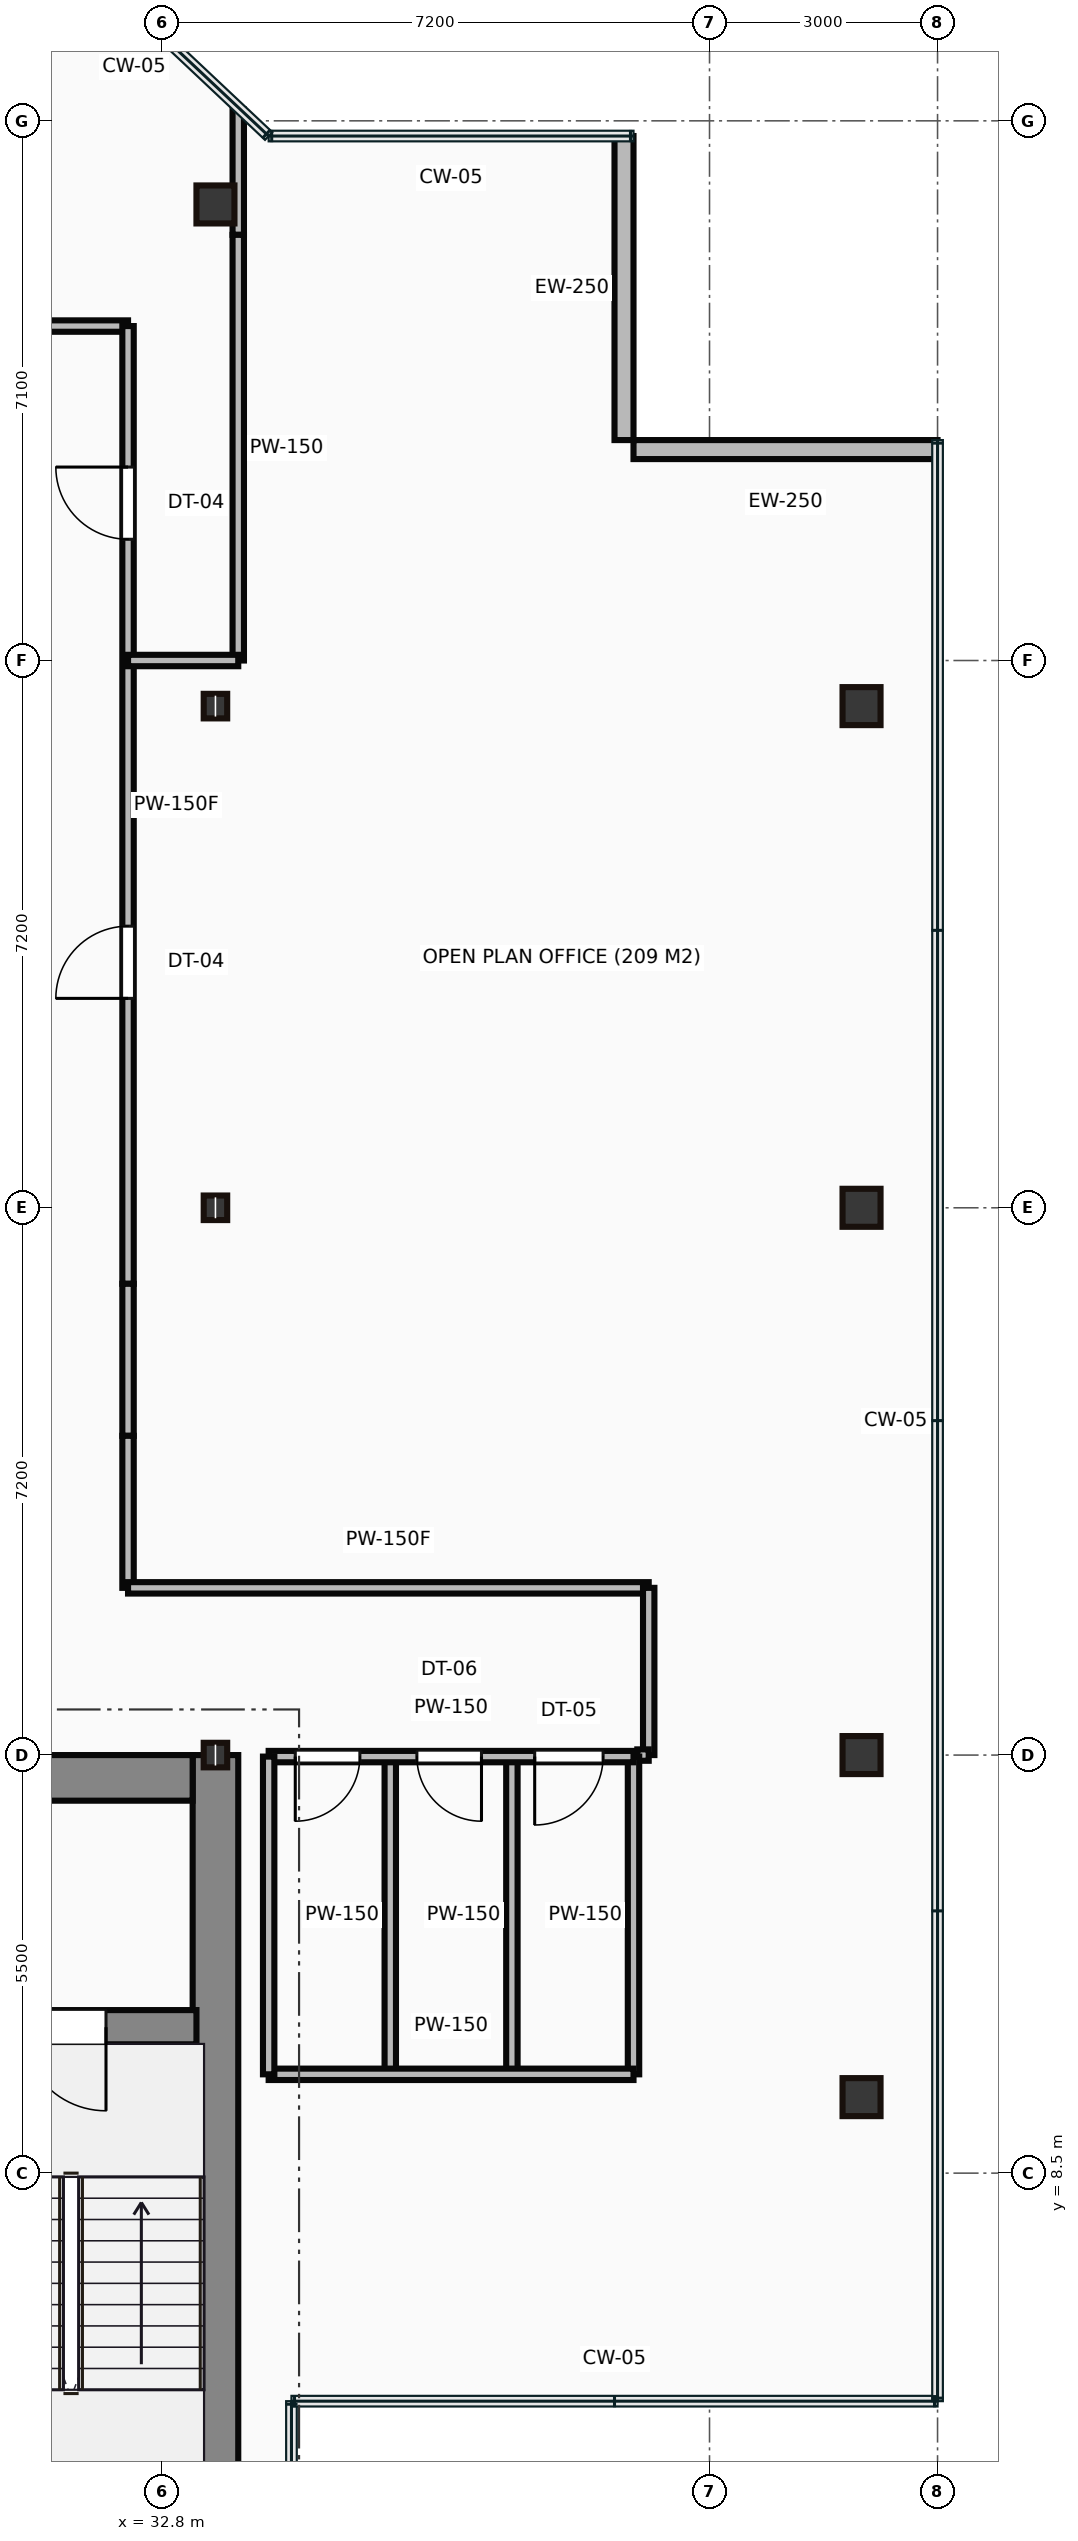
"""IFC4 building model, lengths in metres.
Left out: names, types, materials, properties, quantities, classifications, styles, units other than length and angle.
Written with IfcOpenShell. Run it as: python <this file> out.ifc"""

import sys

from ifc_helpers import new_model, si_unit, direction, frame, frame_2d, origin, origin_2d, place, context, subcontext, project, spatial, rectangle, hollow_rectangle, i_section, extrude, source, transform, mapped, element, fill, save


model = new_model("IFC4")
c1 = context("Model", 3, precision=1e-05, world=origin(), true_north=direction((0.0, 1.0)))
c2 = subcontext(c1, "Body", "Model", "MODEL_VIEW")
j1 = project(units=[si_unit("LENGTHUNIT", "METRE"), si_unit("PLANEANGLEUNIT", "RADIAN")], contexts=[c1])
p1 = place(None, origin())
s1 = spatial("IfcSite", under=j1, at=p1, CompositionType="ELEMENT")
p2 = place(p1, origin())
s2 = spatial("IfcBuilding", under=s1, at=p2, CompositionType="ELEMENT")
p3 = place(p2, frame((0.0, 0.0, 262.45)))
s3 = spatial("IfcBuildingStorey", under=s2, at=p3, CompositionType="ELEMENT", Elevation=262.45)
m1 = source(origin(), c2, "Body", "SweptSolid", [
    extrude(rectangle(XDim=13.1, YDim=0.6, at=frame_2d((6.55, 0.0))), origin(), (0.0, 0.0, 1.0), 3.65),
])
p4 = place(p3, frame((33.5, 0.9, 0.0), z_axis=(0.0, 0.0, 1.0), x_axis=(0.0, 1.0, 0.0)))
e1 = element("IfcWall", 1, at=p4, inside=s3, PredefinedType="SHEAR", context=c2, shape_type="MappedRepresentation", body=[
    mapped(m1, transform((0.0, 0.0, 0.0))),
])
m2 = source(origin(), c2, "Body", "SweptSolid", [
    extrude(rectangle(XDim=12.6, YDim=0.6, at=frame_2d((6.3, 0.0))), origin(), (0.0, 0.0, 1.0), 3.65),
])
p5 = place(p3, frame((20.6, 13.7, 0.0), z_axis=(0.0, 0.0, 1.0), x_axis=(1.0, 0.0, 0.0)))
e2 = element("IfcWall", 2, at=p5, inside=s3, PredefinedType="SHEAR", context=c2, shape_type="MappedRepresentation", body=[
    mapped(m2, transform((0.0, 0.0, 0.0))),
])
p6 = place(p5, frame((9.25, 0.0, 0.0)))
e3 = element("IfcOpeningElement", 3, at=p6, cuts=e2, PredefinedType="OPENING", context=c2, shape_type="SweptSolid", body=[
    extrude(rectangle(XDim=1.1, YDim=2.15, at=frame_2d((0.55, 1.075))), frame((0.0, 0.31, 0.0), z_axis=(0.0, -1.0, 0.0), x_axis=(1.0, 0.0, 0.0)), (0.0, 0.0, 1.0), 0.62),
])
m3 = source(origin(), c2, "Body", "SweptSolid", [
    extrude(rectangle(XDim=3.39, YDim=0.45, at=frame_2d((1.695, 0.0))), origin(), (0.0, 0.0, 1.0), 3.65),
])
p7 = place(p3, frame((29.86, 10.42, 0.0), z_axis=(0.0, 0.0, 1.0), x_axis=(1.0, 0.0, 0.0)))
e4 = element("IfcWall", 4, at=p7, inside=s3, PredefinedType="SHEAR", context=c2, shape_type="MappedRepresentation", body=[
    mapped(m3, transform((0.0, 0.0, 0.0))),
])
p8 = place(p7, frame((1.1, 0.0, 0.0)))
e5 = element("IfcOpeningElement", 5, at=p8, cuts=e4, PredefinedType="OPENING", context=c2, shape_type="SweptSolid", body=[
    extrude(rectangle(XDim=1.1, YDim=2.15, at=frame_2d((0.55, 1.075))), frame((0.0, 0.235, 0.0), z_axis=(0.0, -1.0, 0.0), x_axis=(1.0, 0.0, 0.0)), (0.0, 0.0, 1.0), 0.47),
])
m4 = source(origin(), c2, "Body", "SweptSolid", [
    extrude(i_section(OverallWidth=0.309, OverallDepth=0.323, WebThickness=0.014, FlangeThickness=0.023, at=origin_2d()), origin(), (0.0, 0.0, 1.0), 3.65),
])
for number, where, z_axis, x_axis in (
    (6, (33.5, 14.0, 0.0), (0.0, 0.0, 1.0), (1.0, 0.0, 0.0)),
    (7, (33.5, 21.2, 0.0), (0.0, 0.0, 1.0), (1.0, 0.0, 0.0)),
    (8, (33.5, 27.8, 0.0), (0.0, 0.0, 1.0), (1.0, 0.0, 0.0)),
):
    element("IfcColumn", number, at=place(p3, frame(where, z_axis=z_axis, x_axis=x_axis)), inside=s3, PredefinedType="COLUMN", context=c2, shape_type="MappedRepresentation", body=[
        mapped(m4, transform((0.0, 0.0, 0.0))),
    ])
m5 = source(origin(), c2, "Body", "SweptSolid", [
    extrude(hollow_rectangle(XDim=0.5, YDim=0.5, WallThickness=0.022, at=origin_2d()), origin(), (0.0, 0.0, 1.0), 3.65),
])
for number, where, z_axis, x_axis in (
    (9, (33.5, 34.4, 0.0), (0.0, 0.0, 1.0), (1.0, 0.0, 0.0)),
    (10, (42.0, 9.5, 0.0), (0.0, 0.0, 1.0), (1.0, 0.0, 0.0)),
    (11, (42.0, 14.0, 0.0), (0.0, 0.0, 1.0), (1.0, 0.0, 0.0)),
    (12, (42.0, 21.2, 0.0), (0.0, 0.0, 1.0), (1.0, 0.0, 0.0)),
    (13, (42.0, 27.8, 0.0), (0.0, 0.0, 1.0), (1.0, 0.0, 0.0)),
):
    element("IfcColumn", number, at=place(p3, frame(where, z_axis=z_axis, x_axis=x_axis)), inside=s3, PredefinedType="COLUMN", context=c2, shape_type="MappedRepresentation", body=[
        mapped(m5, transform((0.0, 0.0, 0.0))),
    ])
m6 = source(origin(), c2, "Body", "SweptSolid", [
    extrude(rectangle(XDim=4.0, YDim=0.25, at=frame_2d((2.0, 0.0))), origin(), (0.0, 0.0, 1.0), 3.4),
])
for number, where, z_axis, x_axis in (
    (14, (43.0, 31.175, 0.0), (0.0, 0.0, 1.0), (-1.0, 0.0, 0.0)),
    (15, (38.875, 31.3, 0.0), (0.0, 0.0, 1.0), (0.0, 1.0, 0.0)),
):
    element("IfcWall", number, at=place(p3, frame(where, z_axis=z_axis, x_axis=x_axis)), inside=s3, PredefinedType="STANDARD", context=c2, shape_type="MappedRepresentation", body=[
        mapped(m6, transform((0.0, 0.0, 0.0))),
    ])
m7 = source(origin(), c2, "Body", "SweptSolid", [
    extrude(rectangle(XDim=4.8, YDim=0.15, at=frame_2d((2.4, 0.0))), origin(), (0.0, 0.0, 1.0), 2.787),
])
p9 = place(p3, frame((34.2, 13.98, 0.0), z_axis=(0.0, 0.0, 1.0), x_axis=(1.0, 0.0, 0.0)))
e16 = element("IfcWall", 16, at=p9, inside=s3, PredefinedType="PARTITIONING", context=c2, shape_type="MappedRepresentation", body=[
    mapped(m7, transform((0.0, 0.0, 0.0))),
])
p10 = place(p9, frame((0.35, 0.0, 0.0)))
e17 = element("IfcOpeningElement", 17, at=p10, cuts=e16, PredefinedType="OPENING", context=c2, shape_type="SweptSolid", body=[
    extrude(rectangle(XDim=0.85, YDim=2.1, at=frame_2d((0.425, 1.05))), frame((0.0, 0.085, 0.0), z_axis=(0.0, -1.0, 0.0), x_axis=(1.0, 0.0, 0.0)), (0.0, 0.0, 1.0), 0.17),
])
p11 = place(p9, frame((1.95, 0.0, 0.0)))
e18 = element("IfcOpeningElement", 18, at=p11, cuts=e16, PredefinedType="OPENING", context=c2, shape_type="SweptSolid", body=[
    extrude(rectangle(XDim=0.85, YDim=2.1, at=frame_2d((0.425, 1.05))), frame((0.0, 0.085, 0.0), z_axis=(0.0, -1.0, 0.0), x_axis=(1.0, 0.0, 0.0)), (0.0, 0.0, 1.0), 0.17),
])
p12 = place(p9, frame((3.5, 0.0, 0.0)))
e19 = element("IfcOpeningElement", 19, at=p12, cuts=e16, PredefinedType="OPENING", context=c2, shape_type="SweptSolid", body=[
    extrude(rectangle(XDim=0.9, YDim=2.1, at=frame_2d((0.45, 1.05))), frame((0.0, 0.085, 0.0), z_axis=(0.0, -1.0, 0.0), x_axis=(1.0, 0.0, 0.0)), (0.0, 0.0, 1.0), 0.17),
])
m8 = source(origin(), c2, "Body", "SweptSolid", [
    extrude(rectangle(XDim=4.8, YDim=0.15, at=frame_2d((2.4, 0.0))), origin(), (0.0, 0.0, 1.0), 3.4),
])
p13 = place(p3, frame((34.2, 9.8, 0.0), z_axis=(0.0, 0.0, 1.0), x_axis=(1.0, 0.0, 0.0)))
e20 = element("IfcWall", 20, at=p13, inside=s3, PredefinedType="PARTITIONING", context=c2, shape_type="MappedRepresentation", body=[
    mapped(m8, transform((0.0, 0.0, 0.0))),
])
m9 = source(origin(), c2, "Body", "SweptSolid", [
    extrude(rectangle(XDim=4.18, YDim=0.15, at=frame_2d((2.09, 0.0))), origin(), (0.0, 0.0, 1.0), 3.4),
])
for number, where, z_axis, x_axis in (
    (21, (39.0, 9.8, 0.0), (0.0, 0.0, 1.0), (0.0, 1.0, 0.0)),
    (22, (34.2, 9.8, 0.0), (0.0, 0.0, 1.0), (0.0, 1.0, 0.0)),
    (23, (35.8, 9.8, 0.0), (0.0, 0.0, 1.0), (0.0, 1.0, 0.0)),
    (24, (37.4, 9.8, 0.0), (0.0, 0.0, 1.0), (0.0, 1.0, 0.0)),
):
    element("IfcWall", number, at=place(p3, frame(where, z_axis=z_axis, x_axis=x_axis)), inside=s3, PredefinedType="PARTITIONING", context=c2, shape_type="MappedRepresentation", body=[
        mapped(m9, transform((0.0, 0.0, 0.0))),
    ])
m10 = source(origin(), c2, "Body", "SweptSolid", [
    extrude(rectangle(XDim=2.15, YDim=0.15, at=frame_2d((1.075, 0.0))), origin(), (0.0, 0.0, 1.0), 3.4),
])
p14 = place(p3, frame((30.2, 32.8, 0.0), z_axis=(0.0, 0.0, 1.0), x_axis=(1.0, 0.0, 0.0)))
e25 = element("IfcWall", 25, at=p14, inside=s3, PredefinedType="PARTITIONING", context=c2, shape_type="MappedRepresentation", body=[
    mapped(m10, transform((0.0, 0.0, 0.0))),
])
m11 = source(origin(), c2, "Body", "SweptSolid", [
    extrude(rectangle(XDim=12.6, YDim=0.15, at=frame_2d((6.3, 0.0))), origin(), (0.0, 0.0, 1.0), 3.4),
])
p15 = place(p3, frame((32.35, 32.8, 0.0), z_axis=(0.0, 0.0, 1.0), x_axis=(0.0, -1.0, 0.0)))
e26 = element("IfcWall", 26, at=p15, inside=s3, PredefinedType="PARTITIONING", context=c2, shape_type="MappedRepresentation", body=[
    mapped(m11, transform((0.0, 0.0, 0.0))),
])
p16 = place(p15, frame((1.855, 0.0, 0.0)))
e27 = element("IfcOpeningElement", 27, at=p16, cuts=e26, PredefinedType="OPENING", context=c2, shape_type="SweptSolid", body=[
    extrude(rectangle(XDim=0.95, YDim=2.15, at=frame_2d((0.475, 1.075))), frame((0.0, 0.085, 0.0), z_axis=(0.0, -1.0, 0.0), x_axis=(1.0, 0.0, 0.0)), (0.0, 0.0, 1.0), 0.17),
])
p17 = place(p15, frame((7.895, 0.0, 0.0)))
e28 = element("IfcOpeningElement", 28, at=p17, cuts=e26, PredefinedType="OPENING", context=c2, shape_type="SweptSolid", body=[
    extrude(rectangle(XDim=0.95, YDim=2.15, at=frame_2d((0.475, 1.075))), frame((0.0, 0.085, 0.0), z_axis=(0.0, -1.0, 0.0), x_axis=(1.0, 0.0, 0.0)), (0.0, 0.0, 1.0), 0.17),
])
m12 = source(origin(), c2, "Body", "SweptSolid", [
    extrude(rectangle(XDim=2.0, YDim=0.15, at=frame_2d((1.0, 0.0))), origin(), (0.0, 0.0, 1.0), 3.4),
])
for number, where, z_axis, x_axis in (
    (29, (32.35, 20.2, 0.0), (0.0, 0.0, 1.0), (0.0, -1.0, 0.0)),
    (30, (32.35, 18.2, 0.0), (0.0, 0.0, 1.0), (0.0, -1.0, 0.0)),
):
    element("IfcWall", number, at=place(p3, frame(where, z_axis=z_axis, x_axis=x_axis)), inside=s3, PredefinedType="PARTITIONING", context=c2, shape_type="MappedRepresentation", body=[
        mapped(m12, transform((0.0, 0.0, 0.0))),
    ])
m13 = source(origin(), c2, "Body", "SweptSolid", [
    extrude(rectangle(XDim=6.85, YDim=0.15, at=frame_2d((3.425, 0.0))), origin(), (0.0, 0.0, 1.0), 3.4),
])
p18 = place(p3, frame((32.35, 16.2, 0.0), z_axis=(0.0, 0.0, 1.0), x_axis=(1.0, 0.0, 0.0)))
e31 = element("IfcWall", 31, at=p18, inside=s3, PredefinedType="PARTITIONING", context=c2, shape_type="MappedRepresentation", body=[
    mapped(m13, transform((0.0, 0.0, 0.0))),
])
m14 = source(origin(), c2, "Body", "SweptSolid", [
    extrude(rectangle(XDim=2.2, YDim=0.15, at=frame_2d((1.1, 0.0))), origin(), (0.0, 0.0, 1.0), 3.4),
])
p19 = place(p3, frame((39.2, 16.2, 0.0), z_axis=(0.0, 0.0, 1.0), x_axis=(0.0, -1.0, 0.0)))
e32 = element("IfcWall", 32, at=p19, inside=s3, PredefinedType="PARTITIONING", context=c2, shape_type="MappedRepresentation", body=[
    mapped(m14, transform((0.0, 0.0, 0.0))),
])
m15 = source(origin(), c2, "Body", "SweptSolid", [
    extrude(rectangle(XDim=0.15, YDim=0.15, at=frame_2d((0.075, 0.0))), origin(), (0.0, 0.0, 1.0), 3.4),
])
p20 = place(p3, frame((39.2, 14.0, 0.0), z_axis=(0.0, 0.0, 1.0), x_axis=(-1.0, 0.0, 0.0)))
e33 = element("IfcWall", 33, at=p20, inside=s3, PredefinedType="PARTITIONING", context=c2, shape_type="MappedRepresentation", body=[
    mapped(m15, transform((0.0, 0.0, 0.0))),
])
m16 = source(origin(), c2, "Body", "SweptSolid", [
    extrude(rectangle(XDim=1.649, YDim=0.15, at=frame_2d((0.825, 0.0))), origin(), (0.0, 0.0, 1.0), 3.4),
])
p21 = place(p3, frame((33.8, 35.649, 0.0), z_axis=(0.0, 0.0, 1.0), x_axis=(0.0, -1.0, 0.0)))
e34 = element("IfcWall", 34, at=p21, inside=s3, PredefinedType="PARTITIONING", context=c2, shape_type="MappedRepresentation", body=[
    mapped(m16, transform((0.0, 0.0, 0.0))),
])
m17 = source(origin(), c2, "Body", "SweptSolid", [
    extrude(rectangle(XDim=5.6, YDim=0.15, at=frame_2d((2.8, 0.0))), origin(), (0.0, 0.0, 1.0), 3.4),
])
p22 = place(p3, frame((33.8, 34.0, 0.0), z_axis=(0.0, 0.0, 1.0), x_axis=(0.0, -1.0, 0.0)))
e35 = element("IfcWall", 35, at=p22, inside=s3, PredefinedType="PARTITIONING", context=c2, shape_type="MappedRepresentation", body=[
    mapped(m17, transform((0.0, 0.0, 0.0))),
])
m18 = source(origin(), c2, "Body", "SweptSolid", [
    extrude(rectangle(XDim=1.45, YDim=0.15, at=frame_2d((0.725, 0.0))), origin(), (0.0, 0.0, 1.0), 3.4),
])
p23 = place(p3, frame((33.8, 28.4, 0.0), z_axis=(0.0, 0.0, 1.0), x_axis=(-1.0, 0.0, 0.0)))
e36 = element("IfcWall", 36, at=p23, inside=s3, PredefinedType="PARTITIONING", context=c2, shape_type="MappedRepresentation", body=[
    mapped(m18, transform((0.0, 0.0, 0.0))),
])
m19 = source(origin(), c2, "Body", "SweptSolid", [
    extrude(rectangle(XDim=1.1, YDim=2.15, at=frame_2d((0.55, 1.075))), frame((0.0, 0.025, 0.0), z_axis=(0.0, -1.0, 0.0), x_axis=(1.0, 0.0, 0.0)), (0.0, 0.0, 1.0), 0.05),
])
p24 = place(p8, frame((1.1, 0.0, 0.0), z_axis=(0.0, 0.0, 1.0), x_axis=(-1.0, 0.0, 0.0)))
e37 = element("IfcDoor", 37, at=p24, inside=s3, OperationType="SINGLE_SWING_RIGHT", PredefinedType="DOOR", context=c2, shape_type="MappedRepresentation", body=[
    mapped(m19, transform((0.0, 0.0, 0.0))),
])
fill(e5, e37)
m20 = source(origin(), c2, "Body", "SweptSolid", [
    extrude(rectangle(XDim=0.85, YDim=2.1, at=frame_2d((0.425, 1.05))), frame((0.0, 0.025, 0.0), z_axis=(0.0, -1.0, 0.0), x_axis=(1.0, 0.0, 0.0)), (0.0, 0.0, 1.0), 0.05),
])
p25 = place(p10, frame((0.85, 0.0, 0.0), z_axis=(0.0, 0.0, 1.0), x_axis=(-1.0, 0.0, 0.0)))
e38 = element("IfcDoor", 38, at=p25, inside=s3, OperationType="SINGLE_SWING_LEFT", PredefinedType="DOOR", context=c2, shape_type="MappedRepresentation", body=[
    mapped(m20, transform((0.0, 0.0, 0.0))),
])
fill(e17, e38)
p26 = place(p11, frame((0.85, 0.0, 0.0), z_axis=(0.0, 0.0, 1.0), x_axis=(-1.0, 0.0, 0.0)))
e39 = element("IfcDoor", 39, at=p26, inside=s3, OperationType="SINGLE_SWING_RIGHT", PredefinedType="DOOR", context=c2, shape_type="MappedRepresentation", body=[
    mapped(m20, transform((0.0, 0.0, 0.0))),
])
fill(e18, e39)
m21 = source(origin(), c2, "Body", "SweptSolid", [
    extrude(rectangle(XDim=0.9, YDim=2.1, at=frame_2d((0.45, 1.05))), frame((0.0, 0.025, 0.0), z_axis=(0.0, -1.0, 0.0), x_axis=(1.0, 0.0, 0.0)), (0.0, 0.0, 1.0), 0.05),
])
p27 = place(p12, frame((0.9, 0.0, 0.0), z_axis=(0.0, 0.0, 1.0), x_axis=(-1.0, 0.0, 0.0)))
e40 = element("IfcDoor", 40, at=p27, inside=s3, OperationType="SINGLE_SWING_LEFT", PredefinedType="DOOR", context=c2, shape_type="MappedRepresentation", body=[
    mapped(m21, transform((0.0, 0.0, 0.0))),
])
fill(e19, e40)
m22 = source(origin(), c2, "Body", "SweptSolid", [
    extrude(rectangle(XDim=0.95, YDim=2.15, at=frame_2d((0.475, 1.075))), frame((0.0, 0.025, 0.0), z_axis=(0.0, -1.0, 0.0), x_axis=(1.0, 0.0, 0.0)), (0.0, 0.0, 1.0), 0.05),
])
p28 = place(p16, origin())
e41 = element("IfcDoor", 41, at=p28, inside=s3, OperationType="SINGLE_SWING_LEFT", PredefinedType="DOOR", context=c2, shape_type="MappedRepresentation", body=[
    mapped(m22, transform((0.0, 0.0, 0.0))),
])
fill(e27, e41)
p29 = place(p17, origin())
e42 = element("IfcDoor", 42, at=p29, inside=s3, OperationType="SINGLE_SWING_RIGHT", PredefinedType="DOOR", context=c2, shape_type="MappedRepresentation", body=[
    mapped(m22, transform((0.0, 0.0, 0.0))),
])
fill(e28, e42)
save(model, sys.argv[1])
